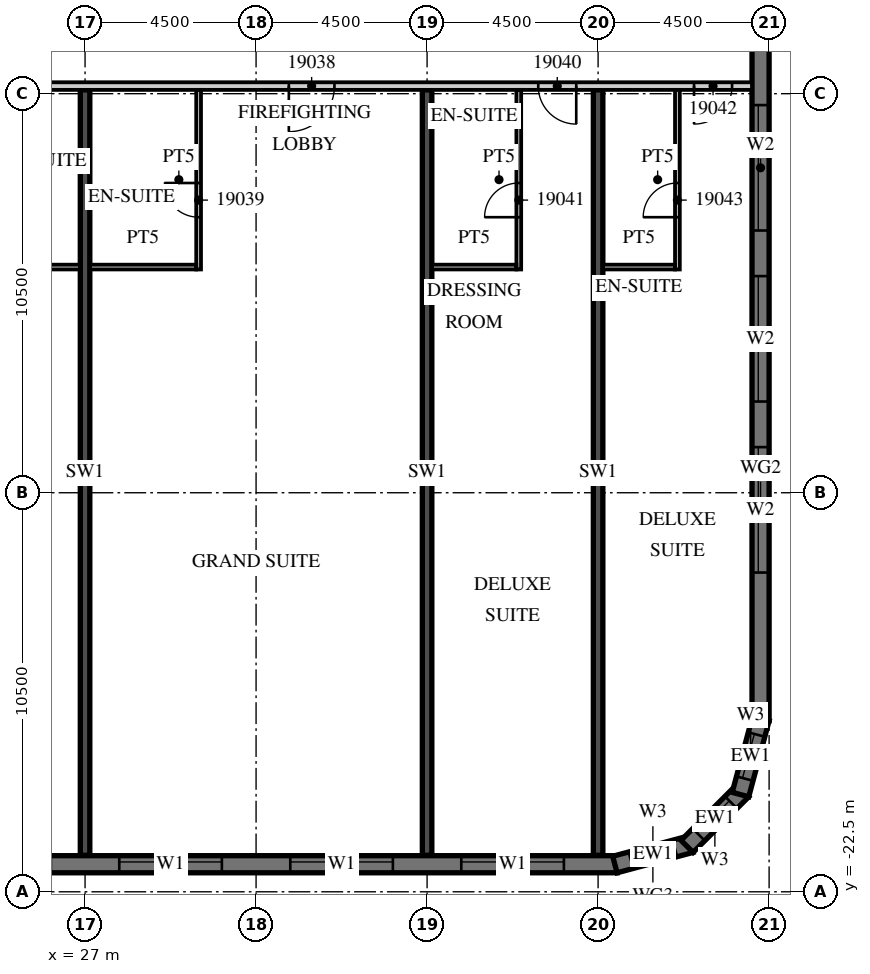
"""IFC4 building model, lengths in metres.
Left out: names, types, materials, properties, quantities, classifications, styles, units other than length and angle.
Written with IfcOpenShell. Run it as: python <this file> out.ifc"""

import sys

from ifc_helpers import new_model, si_unit, direction, frame, frame_2d, origin, place, context, subcontext, project, spatial, polyline, rectangle, outline, extrude, element, fill, save


model = new_model("IFC4")
c1 = context("Model", 3, precision=1e-05, world=origin(), true_north=direction((0.0, 1.0)))
c2 = subcontext(c1, "Body", "Model", "MODEL_VIEW")
j1 = project(units=[si_unit("LENGTHUNIT", "METRE"), si_unit("PLANEANGLEUNIT", "RADIAN")], contexts=[c1])
p1 = place(None, origin())
s1 = spatial("IfcSite", under=j1, at=p1, CompositionType="ELEMENT")
p2 = place(p1, origin())
s2 = spatial("IfcBuilding", under=s1, at=p2, CompositionType="ELEMENT")
p3 = place(p2, frame((0.0, 0.0, 93.0)))
s3 = spatial("IfcBuildingStorey", under=s2, at=p3, CompositionType="ELEMENT", Elevation=93.0)
for number, where, z_axis, x_axis in (
    (1, (27.0, -21.54, 0.0), (0.0, 0.0, 1.0), (0.0, 1.0, 0.0)),
    (2, (36.0, -21.54, 0.0), (0.0, 0.0, 1.0), (0.0, 1.0, 0.0)),
    (3, (40.5, -21.54, 0.0), (0.0, 0.0, 1.0), (0.0, 1.0, 0.0)),
):
    element("IfcWall", number, at=place(p3, frame(where, z_axis=z_axis, x_axis=x_axis)), inside=s3, PredefinedType="SHEAR", context=c2, shape_type="SweptSolid", body=[
        extrude(rectangle(XDim=20.14, YDim=0.25, at=frame_2d((10.07, 0.0))), origin(), (0.0, 0.0, 1.0), 3.3),
    ])
p4 = place(p3, frame((-13.5, -21.775, 0.0), z_axis=(0.0, 0.0, 1.0), x_axis=(1.0, 0.0, 0.0)))
e4 = element("IfcWall", 4, at=p4, inside=s3, PredefinedType="SOLIDWALL", context=c2, shape_type="SweptSolid", body=[
    extrude(rectangle(XDim=54.5, YDim=0.45, at=frame_2d((27.25, 0.0))), origin(), (0.0, 0.0, 1.0), 3.02),
])
p5 = place(p4, frame((0.9, 0.0, 0.45)))
e5 = element("IfcOpeningElement", 5, at=p5, cuts=e4, PredefinedType="OPENING", context=c2, shape_type="SweptSolid", body=[
    extrude(rectangle(XDim=2.7, YDim=2.25, at=frame_2d((1.35, 1.125))), frame((0.0, 0.235, 0.0), z_axis=(0.0, -1.0, 0.0), x_axis=(1.0, 0.0, 0.0)), (0.0, 0.0, 1.0), 0.47),
])
p6 = place(p4, frame((5.4, 0.0, 0.45)))
e6 = element("IfcOpeningElement", 6, at=p6, cuts=e4, PredefinedType="OPENING", context=c2, shape_type="SweptSolid", body=[
    extrude(rectangle(XDim=2.7, YDim=2.25, at=frame_2d((1.35, 1.125))), frame((0.0, 0.235, 0.0), z_axis=(0.0, -1.0, 0.0), x_axis=(1.0, 0.0, 0.0)), (0.0, 0.0, 1.0), 0.47),
])
p7 = place(p4, frame((9.9, 0.0, 0.45)))
e7 = element("IfcOpeningElement", 7, at=p7, cuts=e4, PredefinedType="OPENING", context=c2, shape_type="SweptSolid", body=[
    extrude(rectangle(XDim=2.7, YDim=2.25, at=frame_2d((1.35, 1.125))), frame((0.0, 0.235, 0.0), z_axis=(0.0, -1.0, 0.0), x_axis=(1.0, 0.0, 0.0)), (0.0, 0.0, 1.0), 0.47),
])
p8 = place(p4, frame((14.4, 0.0, 0.45)))
e8 = element("IfcOpeningElement", 8, at=p8, cuts=e4, PredefinedType="OPENING", context=c2, shape_type="SweptSolid", body=[
    extrude(rectangle(XDim=2.7, YDim=2.25, at=frame_2d((1.35, 1.125))), frame((0.0, 0.235, 0.0), z_axis=(0.0, -1.0, 0.0), x_axis=(1.0, 0.0, 0.0)), (0.0, 0.0, 1.0), 0.47),
])
p9 = place(p4, frame((18.9, 0.0, 0.45)))
e9 = element("IfcOpeningElement", 9, at=p9, cuts=e4, PredefinedType="OPENING", context=c2, shape_type="SweptSolid", body=[
    extrude(rectangle(XDim=2.7, YDim=2.25, at=frame_2d((1.35, 1.125))), frame((0.0, 0.235, 0.0), z_axis=(0.0, -1.0, 0.0), x_axis=(1.0, 0.0, 0.0)), (0.0, 0.0, 1.0), 0.47),
])
p10 = place(p4, frame((23.4, 0.0, 0.45)))
e10 = element("IfcOpeningElement", 10, at=p10, cuts=e4, PredefinedType="OPENING", context=c2, shape_type="SweptSolid", body=[
    extrude(rectangle(XDim=2.7, YDim=2.25, at=frame_2d((1.35, 1.125))), frame((0.0, 0.235, 0.0), z_axis=(0.0, -1.0, 0.0), x_axis=(1.0, 0.0, 0.0)), (0.0, 0.0, 1.0), 0.47),
])
p11 = place(p4, frame((27.9, 0.0, 0.45)))
e11 = element("IfcOpeningElement", 11, at=p11, cuts=e4, PredefinedType="OPENING", context=c2, shape_type="SweptSolid", body=[
    extrude(rectangle(XDim=2.7, YDim=2.25, at=frame_2d((1.35, 1.125))), frame((0.0, 0.235, 0.0), z_axis=(0.0, -1.0, 0.0), x_axis=(1.0, 0.0, 0.0)), (0.0, 0.0, 1.0), 0.47),
])
p12 = place(p4, frame((32.4, 0.0, 0.45)))
e12 = element("IfcOpeningElement", 12, at=p12, cuts=e4, PredefinedType="OPENING", context=c2, shape_type="SweptSolid", body=[
    extrude(rectangle(XDim=2.7, YDim=2.25, at=frame_2d((1.35, 1.125))), frame((0.0, 0.235, 0.0), z_axis=(0.0, -1.0, 0.0), x_axis=(1.0, 0.0, 0.0)), (0.0, 0.0, 1.0), 0.47),
])
p13 = place(p4, frame((36.9, 0.0, 0.45)))
e13 = element("IfcOpeningElement", 13, at=p13, cuts=e4, PredefinedType="OPENING", context=c2, shape_type="SweptSolid", body=[
    extrude(rectangle(XDim=2.7, YDim=2.25, at=frame_2d((1.35, 1.125))), frame((0.0, 0.235, 0.0), z_axis=(0.0, -1.0, 0.0), x_axis=(1.0, 0.0, 0.0)), (0.0, 0.0, 1.0), 0.47),
])
p14 = place(p4, frame((41.4, 0.0, 0.45)))
e14 = element("IfcOpeningElement", 14, at=p14, cuts=e4, PredefinedType="OPENING", context=c2, shape_type="SweptSolid", body=[
    extrude(rectangle(XDim=2.7, YDim=2.25, at=frame_2d((1.35, 1.125))), frame((0.0, 0.235, 0.0), z_axis=(0.0, -1.0, 0.0), x_axis=(1.0, 0.0, 0.0)), (0.0, 0.0, 1.0), 0.47),
])
p15 = place(p4, frame((45.9, 0.0, 0.45)))
e15 = element("IfcOpeningElement", 15, at=p15, cuts=e4, PredefinedType="OPENING", context=c2, shape_type="SweptSolid", body=[
    extrude(rectangle(XDim=2.7, YDim=2.25, at=frame_2d((1.35, 1.125))), frame((0.0, 0.235, 0.0), z_axis=(0.0, -1.0, 0.0), x_axis=(1.0, 0.0, 0.0)), (0.0, 0.0, 1.0), 0.47),
])
p16 = place(p4, frame((50.4, 0.0, 0.45)))
e16 = element("IfcOpeningElement", 16, at=p16, cuts=e4, PredefinedType="OPENING", context=c2, shape_type="SweptSolid", body=[
    extrude(rectangle(XDim=2.7, YDim=2.25, at=frame_2d((1.35, 1.125))), frame((0.0, 0.235, 0.0), z_axis=(0.0, -1.0, 0.0), x_axis=(1.0, 0.0, 0.0)), (0.0, 0.0, 1.0), 0.47),
])
p17 = place(p3, frame((40.942, -21.783, 0.0), z_axis=(0.0, 0.0, 1.0), x_axis=(0.965926999034, 0.25881466832, 0.0)))
e17 = element("IfcWall", 17, at=p17, inside=s3, PredefinedType="SOLIDWALL", context=c2, shape_type="SweptSolid", body=[
    extrude(outline(polyline([(0.0, -0.225), (2.071, -0.225), (1.95, 0.225), (0.121, 0.225), (0.0, -0.225)])), origin(), (0.0, 0.0, 1.0), 3.02),
])
p18 = place(p17, frame((0.435, 0.0, 0.45)))
e18 = element("IfcOpeningElement", 18, at=p18, cuts=e17, PredefinedType="OPENING", context=c2, shape_type="SweptSolid", body=[
    extrude(rectangle(XDim=1.2, YDim=2.25, at=frame_2d((0.6, 1.125))), frame((0.0, 0.235, 0.0), z_axis=(0.0, -1.0, 0.0), x_axis=(1.0, 0.0, 0.0)), (0.0, 0.0, 1.0), 0.47),
])
p19 = place(p3, frame((42.841, -21.305, 0.0), z_axis=(0.0, 0.0, 1.0), x_axis=(0.707106781187, 0.707106781187, 0.0)))
e19 = element("IfcWall", 19, at=p19, inside=s3, PredefinedType="SOLIDWALL", context=c2, shape_type="SweptSolid", body=[
    extrude(outline(polyline([(0.0, -0.225), (2.071, -0.225), (1.95, 0.225), (0.121, 0.225), (0.0, -0.225)])), origin(), (0.0, 0.0, 1.0), 3.02),
])
p20 = place(p19, frame((0.435, 0.0, 0.45)))
e20 = element("IfcOpeningElement", 20, at=p20, cuts=e19, PredefinedType="OPENING", context=c2, shape_type="SweptSolid", body=[
    extrude(rectangle(XDim=1.2, YDim=2.25, at=frame_2d((0.6, 1.125))), frame((0.0, 0.235, 0.0), z_axis=(0.0, -1.0, 0.0), x_axis=(1.0, 0.0, 0.0)), (0.0, 0.0, 1.0), 0.47),
])
p21 = place(p3, frame((44.247, -19.942, 0.0), z_axis=(0.0, 0.0, 1.0), x_axis=(0.25881466832, 0.965926999034, 0.0)))
e21 = element("IfcWall", 21, at=p21, inside=s3, PredefinedType="SOLIDWALL", context=c2, shape_type="SweptSolid", body=[
    extrude(outline(polyline([(-0.0, -0.225), (2.07, -0.225), (1.95, 0.225), (0.12, 0.225), (-0.0, -0.225)])), origin(), (0.0, 0.0, 1.0), 3.02),
])
p22 = place(p21, frame((0.435, 0.0, 0.45)))
e22 = element("IfcOpeningElement", 22, at=p22, cuts=e21, PredefinedType="OPENING", context=c2, shape_type="SweptSolid", body=[
    extrude(rectangle(XDim=1.2, YDim=2.25, at=frame_2d((0.6, 1.125))), frame((0.0, 0.235, 0.0), z_axis=(0.0, -1.0, 0.0), x_axis=(1.0, 0.0, 0.0)), (0.0, 0.0, 1.0), 0.47),
])
p23 = place(p3, frame((44.775, -18.0, 0.0), z_axis=(0.0, 0.0, 1.0), x_axis=(0.0, 1.0, 0.0)))
e23 = element("IfcWall", 23, at=p23, inside=s3, PredefinedType="SOLIDWALL", context=c2, shape_type="SweptSolid", body=[
    extrude(rectangle(XDim=36.0, YDim=0.45, at=frame_2d((18.0, 0.0))), origin(), (0.0, 0.0, 1.0), 3.02),
])
p24 = place(p23, frame((3.9, 0.0, 0.45)))
e24 = element("IfcOpeningElement", 24, at=p24, cuts=e23, PredefinedType="OPENING", context=c2, shape_type="SweptSolid", body=[
    extrude(rectangle(XDim=3.3, YDim=2.25, at=frame_2d((1.65, 1.125))), frame((0.0, 0.235, 0.0), z_axis=(0.0, -1.0, 0.0), x_axis=(1.0, 0.0, 0.0)), (0.0, 0.0, 1.0), 0.47),
])
p25 = place(p23, frame((8.4, 0.0, 0.45)))
e25 = element("IfcOpeningElement", 25, at=p25, cuts=e23, PredefinedType="OPENING", context=c2, shape_type="SweptSolid", body=[
    extrude(rectangle(XDim=3.3, YDim=2.25, at=frame_2d((1.65, 1.125))), frame((0.0, 0.235, 0.0), z_axis=(0.0, -1.0, 0.0), x_axis=(1.0, 0.0, 0.0)), (0.0, 0.0, 1.0), 0.47),
])
p26 = place(p23, frame((12.9, 0.0, 0.45)))
e26 = element("IfcOpeningElement", 26, at=p26, cuts=e23, PredefinedType="OPENING", context=c2, shape_type="SweptSolid", body=[
    extrude(rectangle(XDim=3.3, YDim=2.25, at=frame_2d((1.65, 1.125))), frame((0.0, 0.235, 0.0), z_axis=(0.0, -1.0, 0.0), x_axis=(1.0, 0.0, 0.0)), (0.0, 0.0, 1.0), 0.47),
])
p27 = place(p3, frame((-13.5, -1.3, 0.0), z_axis=(0.0, 0.0, 1.0), x_axis=(1.0, 0.0, 0.0)))
e27 = element("IfcWall", 27, at=p27, inside=s3, PredefinedType="PARTITIONING", context=c2, shape_type="SweptSolid", body=[
    extrude(rectangle(XDim=58.05, YDim=0.2, at=frame_2d((29.025, 0.0))), origin(), (0.0, 0.0, 1.0), 3.02),
])
p28 = place(p27, frame((0.575, 0.0, 0.0)))
e28 = element("IfcOpeningElement", 28, at=p28, cuts=e27, PredefinedType="OPENING", context=c2, shape_type="SweptSolid", body=[
    extrude(rectangle(XDim=1.0, YDim=2.1, at=frame_2d((0.5, 1.05))), frame((0.0, 0.11, 0.0), z_axis=(0.0, -1.0, 0.0), x_axis=(1.0, 0.0, 0.0)), (0.0, 0.0, 1.0), 0.22),
])
p29 = place(p27, frame((7.45, 0.0, 0.0)))
e29 = element("IfcOpeningElement", 29, at=p29, cuts=e27, PredefinedType="OPENING", context=c2, shape_type="SweptSolid", body=[
    extrude(rectangle(XDim=1.0, YDim=2.1, at=frame_2d((0.5, 1.05))), frame((0.0, 0.11, 0.0), z_axis=(0.0, -1.0, 0.0), x_axis=(1.0, 0.0, 0.0)), (0.0, 0.0, 1.0), 0.22),
])
p30 = place(p27, frame((11.925, 0.0, 0.0)))
e30 = element("IfcOpeningElement", 30, at=p30, cuts=e27, PredefinedType="OPENING", context=c2, shape_type="SweptSolid", body=[
    extrude(rectangle(XDim=1.0, YDim=2.1, at=frame_2d((0.5, 1.05))), frame((0.0, 0.11, 0.0), z_axis=(0.0, -1.0, 0.0), x_axis=(1.0, 0.0, 0.0)), (0.0, 0.0, 1.0), 0.22),
])
p31 = place(p27, frame((14.075, 0.0, 0.0)))
e31 = element("IfcOpeningElement", 31, at=p31, cuts=e27, PredefinedType="OPENING", context=c2, shape_type="SweptSolid", body=[
    extrude(rectangle(XDim=1.0, YDim=2.1, at=frame_2d((0.5, 1.05))), frame((0.0, 0.11, 0.0), z_axis=(0.0, -1.0, 0.0), x_axis=(1.0, 0.0, 0.0)), (0.0, 0.0, 1.0), 0.22),
])
p32 = place(p27, frame((20.925, 0.0, 0.0)))
e32 = element("IfcOpeningElement", 32, at=p32, cuts=e27, PredefinedType="OPENING", context=c2, shape_type="SweptSolid", body=[
    extrude(rectangle(XDim=1.0, YDim=2.1, at=frame_2d((0.5, 1.05))), frame((0.0, 0.11, 0.0), z_axis=(0.0, -1.0, 0.0), x_axis=(1.0, 0.0, 0.0)), (0.0, 0.0, 1.0), 0.22),
])
p33 = place(p27, frame((27.862, 0.0, 0.0)))
e33 = element("IfcOpeningElement", 33, at=p33, cuts=e27, PredefinedType="OPENING", context=c2, shape_type="SweptSolid", body=[
    extrude(rectangle(XDim=1.2, YDim=2.1, at=frame_2d((0.6, 1.05))), frame((0.0, 0.11, 0.0), z_axis=(0.0, -1.0, 0.0), x_axis=(1.0, 0.0, 0.0)), (0.0, 0.0, 1.0), 0.22),
])
p34 = place(p27, frame((33.938, 0.0, 0.0)))
e34 = element("IfcOpeningElement", 34, at=p34, cuts=e27, PredefinedType="OPENING", context=c2, shape_type="SweptSolid", body=[
    extrude(rectangle(XDim=1.2, YDim=2.1, at=frame_2d((0.6, 1.05))), frame((0.0, 0.11, 0.0), z_axis=(0.0, -1.0, 0.0), x_axis=(1.0, 0.0, 0.0)), (0.0, 0.0, 1.0), 0.22),
])
p35 = place(p27, frame((45.862, 0.0, 0.0)))
e35 = element("IfcOpeningElement", 35, at=p35, cuts=e27, PredefinedType="OPENING", context=c2, shape_type="SweptSolid", body=[
    extrude(rectangle(XDim=1.2, YDim=2.1, at=frame_2d((0.6, 1.05))), frame((0.0, 0.11, 0.0), z_axis=(0.0, -1.0, 0.0), x_axis=(1.0, 0.0, 0.0)), (0.0, 0.0, 1.0), 0.22),
])
p36 = place(p27, frame((52.425, 0.0, 0.0)))
e36 = element("IfcOpeningElement", 36, at=p36, cuts=e27, PredefinedType="OPENING", context=c2, shape_type="SweptSolid", body=[
    extrude(rectangle(XDim=1.0, YDim=2.1, at=frame_2d((0.5, 1.05))), frame((0.0, 0.11, 0.0), z_axis=(0.0, -1.0, 0.0), x_axis=(1.0, 0.0, 0.0)), (0.0, 0.0, 1.0), 0.22),
])
p37 = place(p27, frame((56.525, 0.0, 0.0)))
e37 = element("IfcOpeningElement", 37, at=p37, cuts=e27, PredefinedType="OPENING", context=c2, shape_type="SweptSolid", body=[
    extrude(rectangle(XDim=1.0, YDim=2.1, at=frame_2d((0.5, 1.05))), frame((0.0, 0.11, 0.0), z_axis=(0.0, -1.0, 0.0), x_axis=(1.0, 0.0, 0.0)), (0.0, 0.0, 1.0), 0.22),
])
p38 = place(p3, frame((24.075, -6.062, 0.0), z_axis=(0.0, 0.0, 1.0), x_axis=(1.0, 0.0, 0.0)))
e38 = element("IfcWall", 38, at=p38, inside=s3, PredefinedType="PARTITIONING", context=c2, shape_type="SweptSolid", body=[
    extrude(rectangle(XDim=2.8, YDim=0.125, at=frame_2d((1.4, 0.0))), origin(), (0.0, 0.0, 1.0), 3.02),
])
p39 = place(p3, frame((29.988, -6.125, 0.0), z_axis=(0.0, 0.0, 1.0), x_axis=(0.0, 1.0, 0.0)))
e39 = element("IfcWall", 39, at=p39, inside=s3, PredefinedType="PARTITIONING", context=c2, shape_type="SweptSolid", body=[
    extrude(rectangle(XDim=4.725, YDim=0.125, at=frame_2d((2.363, 0.0))), origin(), (0.0, 0.0, 1.0), 3.02),
])
p40 = place(p39, frame((1.375, 0.0, 0.0)))
e40 = element("IfcOpeningElement", 40, at=p40, cuts=e39, PredefinedType="OPENING", context=c2, shape_type="SweptSolid", body=[
    extrude(rectangle(XDim=0.9, YDim=2.1, at=frame_2d((0.45, 1.05))), frame((0.0, 0.073, 0.0), z_axis=(0.0, -1.0, 0.0), x_axis=(1.0, 0.0, 0.0)), (0.0, 0.0, 1.0), 0.145),
])
p41 = place(p3, frame((27.125, -6.062, 0.0), z_axis=(0.0, 0.0, 1.0), x_axis=(1.0, 0.0, 0.0)))
e41 = element("IfcWall", 41, at=p41, inside=s3, PredefinedType="PARTITIONING", context=c2, shape_type="SweptSolid", body=[
    extrude(rectangle(XDim=2.8, YDim=0.125, at=frame_2d((1.4, 0.0))), origin(), (0.0, 0.0, 1.0), 3.02),
])
p42 = place(p3, frame((38.413, -6.125, 0.0), z_axis=(0.0, 0.0, 1.0), x_axis=(0.0, 1.0, 0.0)))
e42 = element("IfcWall", 42, at=p42, inside=s3, PredefinedType="PARTITIONING", context=c2, shape_type="SweptSolid", body=[
    extrude(rectangle(XDim=4.725, YDim=0.125, at=frame_2d((2.363, 0.0))), origin(), (0.0, 0.0, 1.0), 3.02),
])
p43 = place(p42, frame((1.375, 0.0, 0.0)))
e43 = element("IfcOpeningElement", 43, at=p43, cuts=e42, PredefinedType="OPENING", context=c2, shape_type="SweptSolid", body=[
    extrude(rectangle(XDim=0.9, YDim=2.1, at=frame_2d((0.45, 1.05))), frame((0.0, 0.073, 0.0), z_axis=(0.0, -1.0, 0.0), x_axis=(1.0, 0.0, 0.0)), (0.0, 0.0, 1.0), 0.145),
])
p44 = place(p3, frame((36.125, -6.062, 0.0), z_axis=(0.0, 0.0, 1.0), x_axis=(1.0, 0.0, 0.0)))
e44 = element("IfcWall", 44, at=p44, inside=s3, PredefinedType="PARTITIONING", context=c2, shape_type="SweptSolid", body=[
    extrude(rectangle(XDim=2.225, YDim=0.125, at=frame_2d((1.113, 0.0))), origin(), (0.0, 0.0, 1.0), 3.02),
])
p45 = place(p3, frame((42.587, -6.125, 0.0), z_axis=(0.0, 0.0, 1.0), x_axis=(0.0, 1.0, 0.0)))
e45 = element("IfcWall", 45, at=p45, inside=s3, PredefinedType="PARTITIONING", context=c2, shape_type="SweptSolid", body=[
    extrude(rectangle(XDim=4.725, YDim=0.125, at=frame_2d((2.363, 0.0))), origin(), (0.0, 0.0, 1.0), 3.02),
])
p46 = place(p45, frame((1.375, 0.0, 0.0)))
e46 = element("IfcOpeningElement", 46, at=p46, cuts=e45, PredefinedType="OPENING", context=c2, shape_type="SweptSolid", body=[
    extrude(rectangle(XDim=0.9, YDim=2.1, at=frame_2d((0.45, 1.05))), frame((0.0, 0.073, 0.0), z_axis=(0.0, -1.0, 0.0), x_axis=(1.0, 0.0, 0.0)), (0.0, 0.0, 1.0), 0.145),
])
p47 = place(p3, frame((40.625, -6.062, 0.0), z_axis=(0.0, 0.0, 1.0), x_axis=(1.0, 0.0, 0.0)))
e47 = element("IfcWall", 47, at=p47, inside=s3, PredefinedType="PARTITIONING", context=c2, shape_type="SweptSolid", body=[
    extrude(rectangle(XDim=1.9, YDim=0.125, at=frame_2d((0.95, 0.0))), origin(), (0.0, 0.0, 1.0), 3.02),
])
p48 = place(p14, origin())
e48 = element("IfcWindow", 48, at=p48, inside=s3, PartitioningType="SINGLE_PANEL", PredefinedType="WINDOW", context=c2, shape_type="SweptSolid", body=[
    extrude(rectangle(XDim=2.7, YDim=2.25, at=frame_2d((1.35, 1.125))), frame((0.0, 0.09, 0.0), z_axis=(0.0, -1.0, 0.0), x_axis=(1.0, 0.0, 0.0)), (0.0, 0.0, 1.0), 0.06),
])
fill(e14, e48)
p49 = place(p15, origin())
e49 = element("IfcWindow", 49, at=p49, inside=s3, PartitioningType="SINGLE_PANEL", PredefinedType="WINDOW", context=c2, shape_type="SweptSolid", body=[
    extrude(rectangle(XDim=2.7, YDim=2.25, at=frame_2d((1.35, 1.125))), frame((0.0, 0.09, 0.0), z_axis=(0.0, -1.0, 0.0), x_axis=(1.0, 0.0, 0.0)), (0.0, 0.0, 1.0), 0.06),
])
fill(e15, e49)
p50 = place(p16, origin())
e50 = element("IfcWindow", 50, at=p50, inside=s3, PartitioningType="SINGLE_PANEL", PredefinedType="WINDOW", context=c2, shape_type="SweptSolid", body=[
    extrude(rectangle(XDim=2.7, YDim=2.25, at=frame_2d((1.35, 1.125))), frame((0.0, 0.09, 0.0), z_axis=(0.0, -1.0, 0.0), x_axis=(1.0, 0.0, 0.0)), (0.0, 0.0, 1.0), 0.06),
])
fill(e16, e50)
p51 = place(p18, origin())
e51 = element("IfcWindow", 51, at=p51, inside=s3, PartitioningType="SINGLE_PANEL", PredefinedType="WINDOW", context=c2, shape_type="SweptSolid", body=[
    extrude(rectangle(XDim=1.2, YDim=2.25, at=frame_2d((0.6, 1.125))), frame((0.0, 0.09, 0.0), z_axis=(0.0, -1.0, 0.0), x_axis=(1.0, 0.0, 0.0)), (0.0, 0.0, 1.0), 0.06),
])
fill(e18, e51)
p52 = place(p20, origin())
e52 = element("IfcWindow", 52, at=p52, inside=s3, PartitioningType="SINGLE_PANEL", PredefinedType="WINDOW", context=c2, shape_type="SweptSolid", body=[
    extrude(rectangle(XDim=1.2, YDim=2.25, at=frame_2d((0.6, 1.125))), frame((0.0, 0.09, 0.0), z_axis=(0.0, -1.0, 0.0), x_axis=(1.0, 0.0, 0.0)), (0.0, 0.0, 1.0), 0.06),
])
fill(e20, e52)
p53 = place(p22, origin())
e53 = element("IfcWindow", 53, at=p53, inside=s3, PartitioningType="SINGLE_PANEL", PredefinedType="WINDOW", context=c2, shape_type="SweptSolid", body=[
    extrude(rectangle(XDim=1.2, YDim=2.25, at=frame_2d((0.6, 1.125))), frame((0.0, 0.09, 0.0), z_axis=(0.0, -1.0, 0.0), x_axis=(1.0, 0.0, 0.0)), (0.0, 0.0, 1.0), 0.06),
])
fill(e22, e53)
p54 = place(p24, origin())
e54 = element("IfcWindow", 54, at=p54, inside=s3, PartitioningType="SINGLE_PANEL", PredefinedType="WINDOW", context=c2, shape_type="SweptSolid", body=[
    extrude(rectangle(XDim=3.3, YDim=2.25, at=frame_2d((1.65, 1.125))), frame((0.0, 0.09, 0.0), z_axis=(0.0, -1.0, 0.0), x_axis=(1.0, 0.0, 0.0)), (0.0, 0.0, 1.0), 0.06),
])
fill(e24, e54)
p55 = place(p25, origin())
e55 = element("IfcWindow", 55, at=p55, inside=s3, PartitioningType="SINGLE_PANEL", PredefinedType="WINDOW", context=c2, shape_type="SweptSolid", body=[
    extrude(rectangle(XDim=3.3, YDim=2.25, at=frame_2d((1.65, 1.125))), frame((0.0, 0.09, 0.0), z_axis=(0.0, -1.0, 0.0), x_axis=(1.0, 0.0, 0.0)), (0.0, 0.0, 1.0), 0.06),
])
fill(e25, e55)
p56 = place(p26, origin())
e56 = element("IfcWindow", 56, at=p56, inside=s3, PartitioningType="SINGLE_PANEL", PredefinedType="WINDOW", context=c2, shape_type="SweptSolid", body=[
    extrude(rectangle(XDim=3.3, YDim=2.25, at=frame_2d((1.65, 1.125))), frame((0.0, 0.09, 0.0), z_axis=(0.0, -1.0, 0.0), x_axis=(1.0, 0.0, 0.0)), (0.0, 0.0, 1.0), 0.06),
])
fill(e26, e56)
p57 = place(p35, origin())
e57 = element("IfcDoor", 57, at=p57, inside=s3, OperationType="SINGLE_SWING_LEFT", PredefinedType="DOOR", context=c2, shape_type="SweptSolid", body=[
    extrude(rectangle(XDim=1.2, YDim=2.1, at=frame_2d((0.6, 1.05))), frame((0.0, 0.025, 0.0), z_axis=(0.0, -1.0, 0.0), x_axis=(1.0, 0.0, 0.0)), (0.0, 0.0, 1.0), 0.05),
])
fill(e35, e57)
p58 = place(p40, origin())
e58 = element("IfcDoor", 58, at=p58, inside=s3, OperationType="SINGLE_SWING_RIGHT", PredefinedType="DOOR", context=c2, shape_type="SweptSolid", body=[
    extrude(rectangle(XDim=0.9, YDim=2.1, at=frame_2d((0.45, 1.05))), frame((0.0, 0.025, 0.0), z_axis=(0.0, -1.0, 0.0), x_axis=(1.0, 0.0, 0.0)), (0.0, 0.0, 1.0), 0.05),
])
fill(e40, e58)
p59 = place(p36, origin())
e59 = element("IfcDoor", 59, at=p59, inside=s3, OperationType="SINGLE_SWING_RIGHT", PredefinedType="DOOR", context=c2, shape_type="SweptSolid", body=[
    extrude(rectangle(XDim=1.0, YDim=2.1, at=frame_2d((0.5, 1.05))), frame((0.0, 0.025, 0.0), z_axis=(0.0, -1.0, 0.0), x_axis=(1.0, 0.0, 0.0)), (0.0, 0.0, 1.0), 0.05),
])
fill(e36, e59)
p60 = place(p43, origin())
e60 = element("IfcDoor", 60, at=p60, inside=s3, OperationType="SINGLE_SWING_LEFT", PredefinedType="DOOR", context=c2, shape_type="SweptSolid", body=[
    extrude(rectangle(XDim=0.9, YDim=2.1, at=frame_2d((0.45, 1.05))), frame((0.0, 0.025, 0.0), z_axis=(0.0, -1.0, 0.0), x_axis=(1.0, 0.0, 0.0)), (0.0, 0.0, 1.0), 0.05),
])
fill(e43, e60)
p61 = place(p37, origin())
e61 = element("IfcDoor", 61, at=p61, inside=s3, OperationType="SINGLE_SWING_LEFT", PredefinedType="DOOR", context=c2, shape_type="SweptSolid", body=[
    extrude(rectangle(XDim=1.0, YDim=2.1, at=frame_2d((0.5, 1.05))), frame((0.0, 0.025, 0.0), z_axis=(0.0, -1.0, 0.0), x_axis=(1.0, 0.0, 0.0)), (0.0, 0.0, 1.0), 0.05),
])
fill(e37, e61)
p62 = place(p46, origin())
e62 = element("IfcDoor", 62, at=p62, inside=s3, OperationType="SINGLE_SWING_LEFT", PredefinedType="DOOR", context=c2, shape_type="SweptSolid", body=[
    extrude(rectangle(XDim=0.9, YDim=2.1, at=frame_2d((0.45, 1.05))), frame((0.0, 0.025, 0.0), z_axis=(0.0, -1.0, 0.0), x_axis=(1.0, 0.0, 0.0)), (0.0, 0.0, 1.0), 0.05),
])
fill(e46, e62)
save(model, sys.argv[1])
